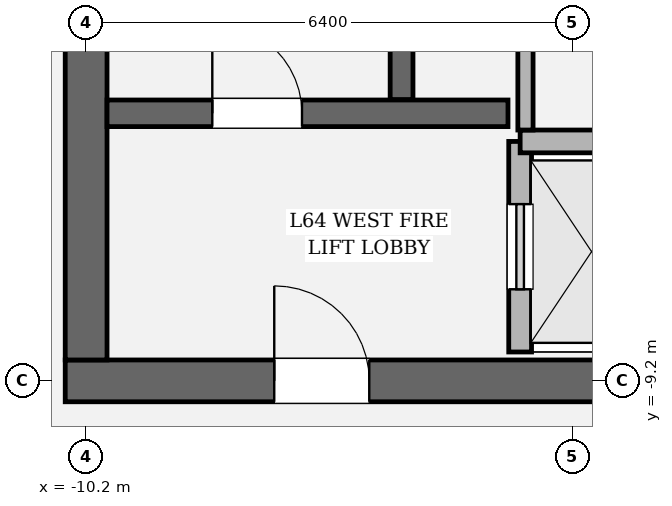
"""IFC4 building model, lengths in metres.
Left out: names, types, materials, properties, quantities, classifications, styles, units other than length and angle.
Written with IfcOpenShell. Run it as: python <this file> out.ifc"""

import sys

from ifc_helpers import new_model, si_unit, direction, frame, frame_2d, origin, place, context, subcontext, project, spatial, rectangle, extrude, element, fill, save


model = new_model("IFC4")
c1 = context("Model", 3, precision=1e-05, world=origin(), true_north=direction((0.0, 1.0)))
c2 = subcontext(c1, "Body", "Model", "MODEL_VIEW")
j1 = project(units=[si_unit("LENGTHUNIT", "METRE"), si_unit("PLANEANGLEUNIT", "RADIAN")], contexts=[c1])
p1 = place(None, origin())
s1 = spatial("IfcSite", under=j1, at=p1, CompositionType="ELEMENT")
p2 = place(p1, origin())
s2 = spatial("IfcBuilding", under=s1, at=p2, CompositionType="ELEMENT")
p3 = place(p2, frame((0.0, 0.0, 271.65)))
s3 = spatial("IfcBuildingStorey", under=s2, at=p3, CompositionType="ELEMENT", Elevation=271.65)
p4 = place(p3, frame((10.475, -9.2, 0.0), z_axis=(0.0, 0.0, 1.0), x_axis=(-1.0, 0.0, 0.0)))
e1 = element("IfcWall", 1, at=p4, inside=s3, PredefinedType="SHEAR", context=c2, shape_type="SweptSolid", body=[
    extrude(rectangle(XDim=20.95, YDim=0.55, at=frame_2d((10.475, 0.0))), origin(), (0.0, 0.0, 1.0), 4.05),
])
p5 = place(p4, frame((2.75, 0.0, 0.0)))
e2 = element("IfcOpeningElement", 2, at=p5, cuts=e1, PredefinedType="OPENING", context=c2, shape_type="SweptSolid", body=[
    extrude(rectangle(XDim=1.25, YDim=2.25, at=frame_2d((0.625, 1.125))), frame((0.0, 0.285, 0.0), z_axis=(0.0, -1.0, 0.0), x_axis=(1.0, 0.0, 0.0)), (0.0, 0.0, 1.0), 0.57),
])
p6 = place(p4, frame((16.95, 0.0, 0.0)))
e3 = element("IfcOpeningElement", 3, at=p6, cuts=e1, PredefinedType="OPENING", context=c2, shape_type="SweptSolid", body=[
    extrude(rectangle(XDim=1.25, YDim=2.25, at=frame_2d((0.625, 1.125))), frame((0.0, 0.285, 0.0), z_axis=(0.0, -1.0, 0.0), x_axis=(1.0, 0.0, 0.0)), (0.0, 0.0, 1.0), 0.57),
])
p7 = place(p3, frame((-10.2, -8.925, 0.0), z_axis=(0.0, 0.0, 1.0), x_axis=(0.0, 1.0, 0.0)))
e4 = element("IfcWall", 4, at=p7, inside=s3, PredefinedType="SHEAR", context=c2, shape_type="SweptSolid", body=[
    extrude(rectangle(XDim=17.85, YDim=0.55, at=frame_2d((8.925, 0.0))), origin(), (0.0, 0.0, 1.0), 4.05),
])
p8 = place(p7, frame((12.715, 0.0, 0.0)))
e5 = element("IfcOpeningElement", 5, at=p8, cuts=e4, PredefinedType="OPENING", context=c2, shape_type="SweptSolid", body=[
    extrude(rectangle(XDim=1.18, YDim=2.2, at=frame_2d((0.59, 1.1))), frame((0.0, 0.285, 0.0), z_axis=(0.0, -1.0, 0.0), x_axis=(1.0, 0.0, 0.0)), (0.0, 0.0, 1.0), 0.57),
])
p9 = place(p3, frame((-6.05, -5.5, 0.0), z_axis=(0.0, 0.0, 1.0), x_axis=(0.0, 1.0, 0.0)))
e6 = element("IfcWall", 6, at=p9, inside=s3, PredefinedType="SOLIDWALL", context=c2, shape_type="SweptSolid", body=[
    extrude(rectangle(XDim=8.95, YDim=0.3, at=frame_2d((4.475, 0.0))), origin(), (0.0, 0.0, 1.0), 4.05),
])
p10 = place(p3, frame((-9.925, -5.68, 0.0), z_axis=(0.0, 0.0, 1.0), x_axis=(1.0, 0.0, 0.0)))
e7 = element("IfcWall", 7, at=p10, inside=s3, PredefinedType="SOLIDWALL", context=c2, shape_type="SweptSolid", body=[
    extrude(rectangle(XDim=5.275, YDim=0.35, at=frame_2d((2.638, 0.0))), origin(), (0.0, 0.0, 1.0), 4.05),
])
p11 = place(p10, frame((1.385, 0.0, 0.0)))
e8 = element("IfcOpeningElement", 8, at=p11, cuts=e7, PredefinedType="OPENING", context=c2, shape_type="SweptSolid", body=[
    extrude(rectangle(XDim=1.18, YDim=2.2, at=frame_2d((0.59, 1.1))), frame((0.0, 0.185, 0.0), z_axis=(0.0, -1.0, 0.0), x_axis=(1.0, 0.0, 0.0)), (0.0, 0.0, 1.0), 0.37),
])
p12 = place(p3, frame((-4.49, -8.82, 0.0), z_axis=(0.0, 0.0, 1.0), x_axis=(0.0, 1.0, 0.0)))
e9 = element("IfcWall", 9, at=p12, inside=s3, PredefinedType="SOLIDWALL", context=c2, shape_type="SweptSolid", body=[
    extrude(rectangle(XDim=2.77, YDim=0.3, at=frame_2d((1.385, 0.0))), origin(), (0.0, 0.0, 1.0), 3.85),
])
p13 = place(p12, frame((0.825, 0.0, 0.0)))
e10 = element("IfcOpeningElement", 10, at=p13, cuts=e9, PredefinedType="OPENING", context=c2, shape_type="SweptSolid", body=[
    extrude(rectangle(XDim=1.12, YDim=2.25, at=frame_2d((0.56, 1.125))), frame((0.0, 0.16, 0.0), z_axis=(0.0, -1.0, 0.0), x_axis=(1.0, 0.0, 0.0)), (0.0, 0.0, 1.0), 0.32),
])
p14 = place(p3, frame((-4.49, -6.05, 0.0), z_axis=(0.0, 0.0, 1.0), x_axis=(1.0, 0.0, 0.0)))
e11 = element("IfcWall", 11, at=p14, inside=s3, PredefinedType="SOLIDWALL", context=c2, shape_type="SweptSolid", body=[
    extrude(rectangle(XDim=1.88, YDim=0.3, at=frame_2d((0.94, 0.0))), origin(), (0.0, 0.0, 1.0), 3.85),
])
p15 = place(p3, frame((-4.42, -4.16, 0.0), z_axis=(0.0, 0.0, 1.0), x_axis=(0.0, -1.0, 0.0)))
e12 = element("IfcWall", 12, at=p15, inside=s3, PredefinedType="SOLIDWALL", context=c2, shape_type="SweptSolid", body=[
    extrude(rectangle(XDim=1.74, YDim=0.2, at=frame_2d((0.87, 0.0))), origin(), (0.0, 0.0, 1.0), 3.85),
])
p16 = place(p11, origin())
e13 = element("IfcDoor", 13, at=p16, inside=s3, OperationType="SINGLE_SWING_LEFT", PredefinedType="DOOR", context=c2, shape_type="SweptSolid", body=[
    extrude(rectangle(XDim=1.18, YDim=2.2, at=frame_2d((0.59, 1.1))), frame((0.0, 0.025, 0.0), z_axis=(0.0, -1.0, 0.0), x_axis=(1.0, 0.0, 0.0)), (0.0, 0.0, 1.0), 0.05),
])
fill(e8, e13)
p17 = place(p6, origin())
e14 = element("IfcDoor", 14, at=p17, inside=s3, OperationType="SINGLE_SWING_RIGHT", PredefinedType="DOOR", context=c2, shape_type="SweptSolid", body=[
    extrude(rectangle(XDim=1.25, YDim=2.25, at=frame_2d((0.625, 1.125))), frame((0.0, 0.025, 0.0), z_axis=(0.0, -1.0, 0.0), x_axis=(1.0, 0.0, 0.0)), (0.0, 0.0, 1.0), 0.05),
])
fill(e3, e14)
p18 = place(p13, origin())
e15 = element("IfcDoor", 15, at=p18, inside=s3, OperationType="SLIDING_TO_LEFT", PredefinedType="DOOR", context=c2, shape_type="SweptSolid", body=[
    extrude(rectangle(XDim=1.12, YDim=2.25, at=frame_2d((0.56, 1.125))), frame((0.0, 0.025, 0.0), z_axis=(0.0, -1.0, 0.0), x_axis=(1.0, 0.0, 0.0)), (0.0, 0.0, 1.0), 0.05),
])
fill(e10, e15)
save(model, sys.argv[1])
